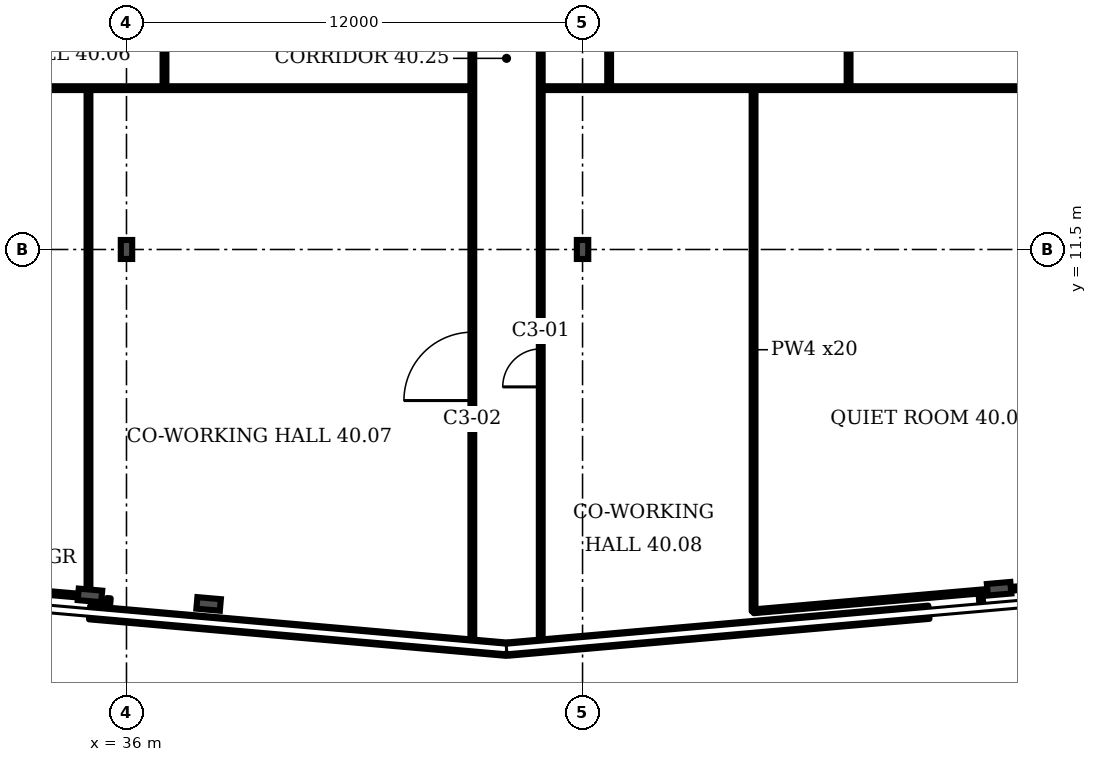
"""IFC4 building model, lengths in metres.
Left out: names, types, materials, properties, quantities, classifications, styles, units other than length and angle.
Written with IfcOpenShell. Run it as: python <this file> out.ifc"""

import sys

from ifc_helpers import new_model, si_unit, direction, frame, frame_2d, origin, origin_2d, place, context, subcontext, project, spatial, rectangle, i_section, extrude, element, fill, save


model = new_model("IFC4")
c1 = context("Model", 3, precision=1e-05, world=origin(), true_north=direction((0.0, 1.0)))
c2 = subcontext(c1, "Body", "Model", "MODEL_VIEW")
j1 = project(units=[si_unit("LENGTHUNIT", "METRE"), si_unit("PLANEANGLEUNIT", "RADIAN")], contexts=[c1])
p1 = place(None, origin())
s1 = spatial("IfcSite", under=j1, at=p1, CompositionType="ELEMENT")
p2 = place(p1, origin())
s2 = spatial("IfcBuilding", under=s1, at=p2, CompositionType="ELEMENT")
p3 = place(p2, frame((0.0, 0.0, 166.3)))
s3 = spatial("IfcBuildingStorey", under=s2, at=p3, CompositionType="ELEMENT", Elevation=166.3)
for number, where, z_axis, x_axis in (
    (1, (35.039, 2.399, 0.0), (0.0, 0.0, 1.0), (-0.087, -0.996, 0.0)),
    (2, (38.161, 2.174, 0.0), (0.0, 0.0, 1.0), (-0.087, -0.996, 0.0)),
    (3, (58.961, 2.573, 0.0), (0.0, 0.0, 1.0), (0.087, -0.996, 0.0)),
):
    element("IfcColumn", number, at=place(p3, frame(where, z_axis=z_axis, x_axis=x_axis)), inside=s3, PredefinedType="COLUMN", context=c2, shape_type="SweptSolid", body=[
        extrude(i_section(OverallWidth=0.305, OverallDepth=0.62, WebThickness=0.021, FlangeThickness=0.04, FilletRadius=0.027, at=origin_2d()), origin(), (0.0, 0.0, 1.0), 3.6),
    ])
for number, where, z_axis, x_axis in (
    (4, (36.0, 11.5, 0.0), (0.0, 0.0, 1.0), (1.0, 0.0, 0.0)),
    (5, (48.0, 11.5, 0.0), (0.0, 0.0, 1.0), (1.0, 0.0, 0.0)),
):
    element("IfcColumn", number, at=place(p3, frame(where, z_axis=z_axis, x_axis=x_axis)), inside=s3, PredefinedType="COLUMN", context=c2, shape_type="SweptSolid", body=[
        extrude(i_section(OverallWidth=0.3, OverallDepth=0.5, WebThickness=0.014, FlangeThickness=0.028, FilletRadius=0.027, at=origin_2d()), origin(), (0.0, 0.0, 1.0), 3.6),
    ])
p4 = place(p3, frame((35.03, 1.943, 0.0), z_axis=(0.0, 0.0, 1.0), x_axis=(0.996199, -0.08714, 0.0)))
e6 = element("IfcWall", 6, at=p4, inside=s3, PredefinedType="SOLIDWALL", context=c2, shape_type="SweptSolid", body=[
    extrude(rectangle(XDim=11.028, YDim=0.35, at=frame_2d((5.514, 0.0))), origin(), (0.0, 0.0, 1.0), 1.0),
])
p5 = place(p3, frame((46.045, 0.987, 0.0), z_axis=(0.0, 0.0, 1.0), x_axis=(0.996193, 0.087171, 0.0)))
e7 = element("IfcWall", 7, at=p5, inside=s3, PredefinedType="SOLIDWALL", context=c2, shape_type="SweptSolid", body=[
    extrude(rectangle(XDim=11.11, YDim=0.35, at=frame_2d((5.555, 0.0))), origin(), (0.0, 0.0, 1.0), 1.0),
])
p6 = place(p3, frame((27.4, 15.745, 0.0), z_axis=(0.0, 0.0, 1.0), x_axis=(1.0, 0.0, 0.0)))
e8 = element("IfcWall", 8, at=p6, inside=s3, PredefinedType="PARTITIONING", context=c2, shape_type="SweptSolid", body=[
    extrude(rectangle(XDim=17.7, YDim=0.1, at=frame_2d((8.85, 0.0))), origin(), (0.0, 0.0, 1.0), 3.2),
])
p7 = place(p3, frame((35.0, 2.37, 0.0), z_axis=(0.0, 0.0, 1.0), x_axis=(-0.996265, 0.086343, 0.0)))
e9 = element("IfcWall", 9, at=p7, inside=s3, PredefinedType="PARTITIONING", context=c2, shape_type="SweptSolid", body=[
    extrude(rectangle(XDim=1.948, YDim=0.1, at=frame_2d((0.974, 0.0))), origin(), (0.0, 0.0, 1.0), 2.58),
])
p8 = place(p3, frame((35.0, 2.37, 0.0), z_axis=(0.0, 0.0, 1.0), x_axis=(0.0, 1.0, 0.0)))
e10 = element("IfcWall", 10, at=p8, inside=s3, PredefinedType="PARTITIONING", context=c2, shape_type="SweptSolid", body=[
    extrude(rectangle(XDim=13.375, YDim=0.1, at=frame_2d((6.688, 0.0))), origin(), (0.0, 0.0, 1.0), 3.2),
])
p9 = place(p3, frame((35.502, 1.927, 0.0), z_axis=(0.0, 0.0, 1.0), x_axis=(0.083045, 0.996542, 0.0)))
e11 = element("IfcWall", 11, at=p9, inside=s3, PredefinedType="PARTITIONING", context=c2, shape_type="SweptSolid", body=[
    extrude(rectangle(XDim=0.4, YDim=0.1, at=frame_2d((0.2, 0.0))), origin(), (0.0, 0.0, 1.0), 3.2),
])
p10 = place(p3, frame((37.0, 15.745, 0.0), z_axis=(0.0, 0.0, 1.0), x_axis=(0.0, 1.0, 0.0)))
e12 = element("IfcWall", 12, at=p10, inside=s3, PredefinedType="PARTITIONING", context=c2, shape_type="SweptSolid", body=[
    extrude(rectangle(XDim=14.755, YDim=0.1, at=frame_2d((7.377, 0.0))), origin(), (0.0, 0.0, 1.0), 3.2),
])
p11 = place(p3, frame((45.1, 1.087, 0.0), z_axis=(0.0, 0.0, 1.0), x_axis=(0.0, 1.0, 0.0)))
e13 = element("IfcWall", 13, at=p11, inside=s3, PredefinedType="PARTITIONING", context=c2, shape_type="SweptSolid", body=[
    extrude(rectangle(XDim=29.413, YDim=0.1, at=frame_2d((14.707, 0.0))), origin(), (0.0, 0.0, 1.0), 3.2),
])
p12 = place(p11, frame((6.438, 0.0, 0.0)))
e14 = element("IfcOpeningElement", 14, at=p12, cuts=e13, PredefinedType="OPENING", context=c2, shape_type="SweptSolid", body=[
    extrude(rectangle(XDim=1.8, YDim=2.1, at=frame_2d((0.9, 1.05))), frame((0.0, 0.06, 0.0), z_axis=(0.0, -1.0, 0.0), x_axis=(1.0, 0.0, 0.0)), (0.0, 0.0, 1.0), 0.12),
])
p13 = place(p11, frame((21.993, 0.0, 0.0)))
e15 = element("IfcOpeningElement", 15, at=p13, cuts=e13, PredefinedType="OPENING", context=c2, shape_type="SweptSolid", body=[
    extrude(rectangle(XDim=1.0, YDim=2.1, at=frame_2d((0.5, 1.05))), frame((0.0, 0.06, 0.0), z_axis=(0.0, -1.0, 0.0), x_axis=(1.0, 0.0, 0.0)), (0.0, 0.0, 1.0), 0.12),
])
p14 = place(p3, frame((46.9, 1.087, 0.0), z_axis=(0.0, 0.0, 1.0), x_axis=(0.0, 1.0, 0.0)))
e16 = element("IfcWall", 16, at=p14, inside=s3, PredefinedType="PARTITIONING", context=c2, shape_type="SweptSolid", body=[
    extrude(rectangle(XDim=29.403, YDim=0.1, at=frame_2d((14.702, 0.0))), origin(), (0.0, 0.0, 1.0), 3.2),
])
p15 = place(p14, frame((6.798, 0.0, 0.0)))
e17 = element("IfcOpeningElement", 17, at=p15, cuts=e16, PredefinedType="OPENING", context=c2, shape_type="SweptSolid", body=[
    extrude(rectangle(XDim=1.0, YDim=2.1, at=frame_2d((0.5, 1.05))), frame((0.0, 0.06, 0.0), z_axis=(0.0, -1.0, 0.0), x_axis=(1.0, 0.0, 0.0)), (0.0, 0.0, 1.0), 0.12),
])
p16 = place(p3, frame((46.91, 15.745, 0.0), z_axis=(0.0, 0.0, 1.0), x_axis=(1.0, 0.0, 0.0)))
e18 = element("IfcWall", 18, at=p16, inside=s3, PredefinedType="PARTITIONING", context=c2, shape_type="SweptSolid", body=[
    extrude(rectangle(XDim=17.69, YDim=0.1, at=frame_2d((8.845, 0.0))), origin(), (0.0, 0.0, 1.0), 3.2),
])
p17 = place(p3, frame((48.7, 15.745, 0.0), z_axis=(0.0, 0.0, 1.0), x_axis=(0.0, 1.0, 0.0)))
e19 = element("IfcWall", 19, at=p17, inside=s3, PredefinedType="PARTITIONING", context=c2, shape_type="SweptSolid", body=[
    extrude(rectangle(XDim=14.745, YDim=0.1, at=frame_2d((7.373, 0.0))), origin(), (0.0, 0.0, 1.0), 3.2),
])
p18 = place(p17, frame((2.469, 0.0, 0.0)))
e20 = element("IfcOpeningElement", 20, at=p18, cuts=e19, PredefinedType="OPENING", context=c2, shape_type="SweptSolid", body=[
    extrude(rectangle(XDim=0.9, YDim=2.1, at=frame_2d((0.45, 1.05))), frame((0.0, 0.06, 0.0), z_axis=(0.0, -1.0, 0.0), x_axis=(1.0, 0.0, 0.0)), (0.0, 0.0, 1.0), 0.12),
])
p19 = place(p17, frame((8.099, 0.0, 0.0)))
e21 = element("IfcOpeningElement", 21, at=p19, cuts=e19, PredefinedType="OPENING", context=c2, shape_type="SweptSolid", body=[
    extrude(rectangle(XDim=0.9, YDim=2.1, at=frame_2d((0.45, 1.05))), frame((0.0, 0.06, 0.0), z_axis=(0.0, -1.0, 0.0), x_axis=(1.0, 0.0, 0.0)), (0.0, 0.0, 1.0), 0.12),
])
p20 = place(p17, frame((12.434, 0.0, 0.0)))
e22 = element("IfcOpeningElement", 22, at=p20, cuts=e19, PredefinedType="OPENING", context=c2, shape_type="SweptSolid", body=[
    extrude(rectangle(XDim=1.0, YDim=2.1, at=frame_2d((0.5, 1.05))), frame((0.0, 0.06, 0.0), z_axis=(0.0, -1.0, 0.0), x_axis=(1.0, 0.0, 0.0)), (0.0, 0.0, 1.0), 0.12),
])
p21 = place(p3, frame((52.5, 1.98, 0.0), z_axis=(0.0, 0.0, 1.0), x_axis=(0.0, 1.0, 0.0)))
e23 = element("IfcWall", 23, at=p21, inside=s3, PredefinedType="PARTITIONING", context=c2, shape_type="SweptSolid", body=[
    extrude(rectangle(XDim=13.765, YDim=0.1, at=frame_2d((6.883, 0.0))), origin(), (0.0, 0.0, 1.0), 3.2),
])
p22 = place(p3, frame((52.5, 1.98, 0.0), z_axis=(0.0, 0.0, 1.0), x_axis=(0.99622, 0.086844, 0.0)))
e24 = element("IfcWall", 24, at=p22, inside=s3, PredefinedType="PARTITIONING", context=c2, shape_type="SweptSolid", body=[
    extrude(rectangle(XDim=9.328, YDim=0.1, at=frame_2d((4.664, 0.0))), origin(), (0.0, 0.0, 1.0), 2.58),
])
p23 = place(p3, frame((55.0, 15.745, 0.0), z_axis=(0.0, 0.0, 1.0), x_axis=(0.0, 1.0, 0.0)))
e25 = element("IfcWall", 25, at=p23, inside=s3, PredefinedType="PARTITIONING", context=c2, shape_type="SweptSolid", body=[
    extrude(rectangle(XDim=13.855, YDim=0.1, at=frame_2d((6.927, 0.0))), origin(), (0.0, 0.0, 1.0), 3.2),
])
p24 = place(p3, frame((58.498, 2.102, 0.0), z_axis=(0.0, 0.0, 1.0), x_axis=(-0.083045, 0.996542, 0.0)))
e26 = element("IfcWall", 26, at=p24, inside=s3, PredefinedType="PARTITIONING", context=c2, shape_type="SweptSolid", body=[
    extrude(rectangle(XDim=0.4, YDim=0.1, at=frame_2d((0.2, 0.0))), origin(), (0.0, 0.0, 1.0), 3.2),
])
p25 = place(p15, origin())
e27 = element("IfcDoor", 27, at=p25, inside=s3, OperationType="SINGLE_SWING_LEFT", PredefinedType="DOOR", context=c2, shape_type="SweptSolid", body=[
    extrude(rectangle(XDim=1.0, YDim=2.1, at=frame_2d((0.5, 1.05))), frame((0.0, 0.025, 0.0), z_axis=(0.0, -1.0, 0.0), x_axis=(1.0, 0.0, 0.0)), (0.0, 0.0, 1.0), 0.05),
])
fill(e17, e27)
p26 = place(p12, origin())
e28 = element("IfcDoor", 28, at=p26, inside=s3, OperationType="DOUBLE_DOOR_SINGLE_SWING", PredefinedType="DOOR", context=c2, shape_type="SweptSolid", body=[
    extrude(rectangle(XDim=1.8, YDim=2.1, at=frame_2d((0.9, 1.05))), frame((0.0, 0.025, 0.0), z_axis=(0.0, -1.0, 0.0), x_axis=(1.0, 0.0, 0.0)), (0.0, 0.0, 1.0), 0.05),
])
fill(e14, e28)
save(model, sys.argv[1])
